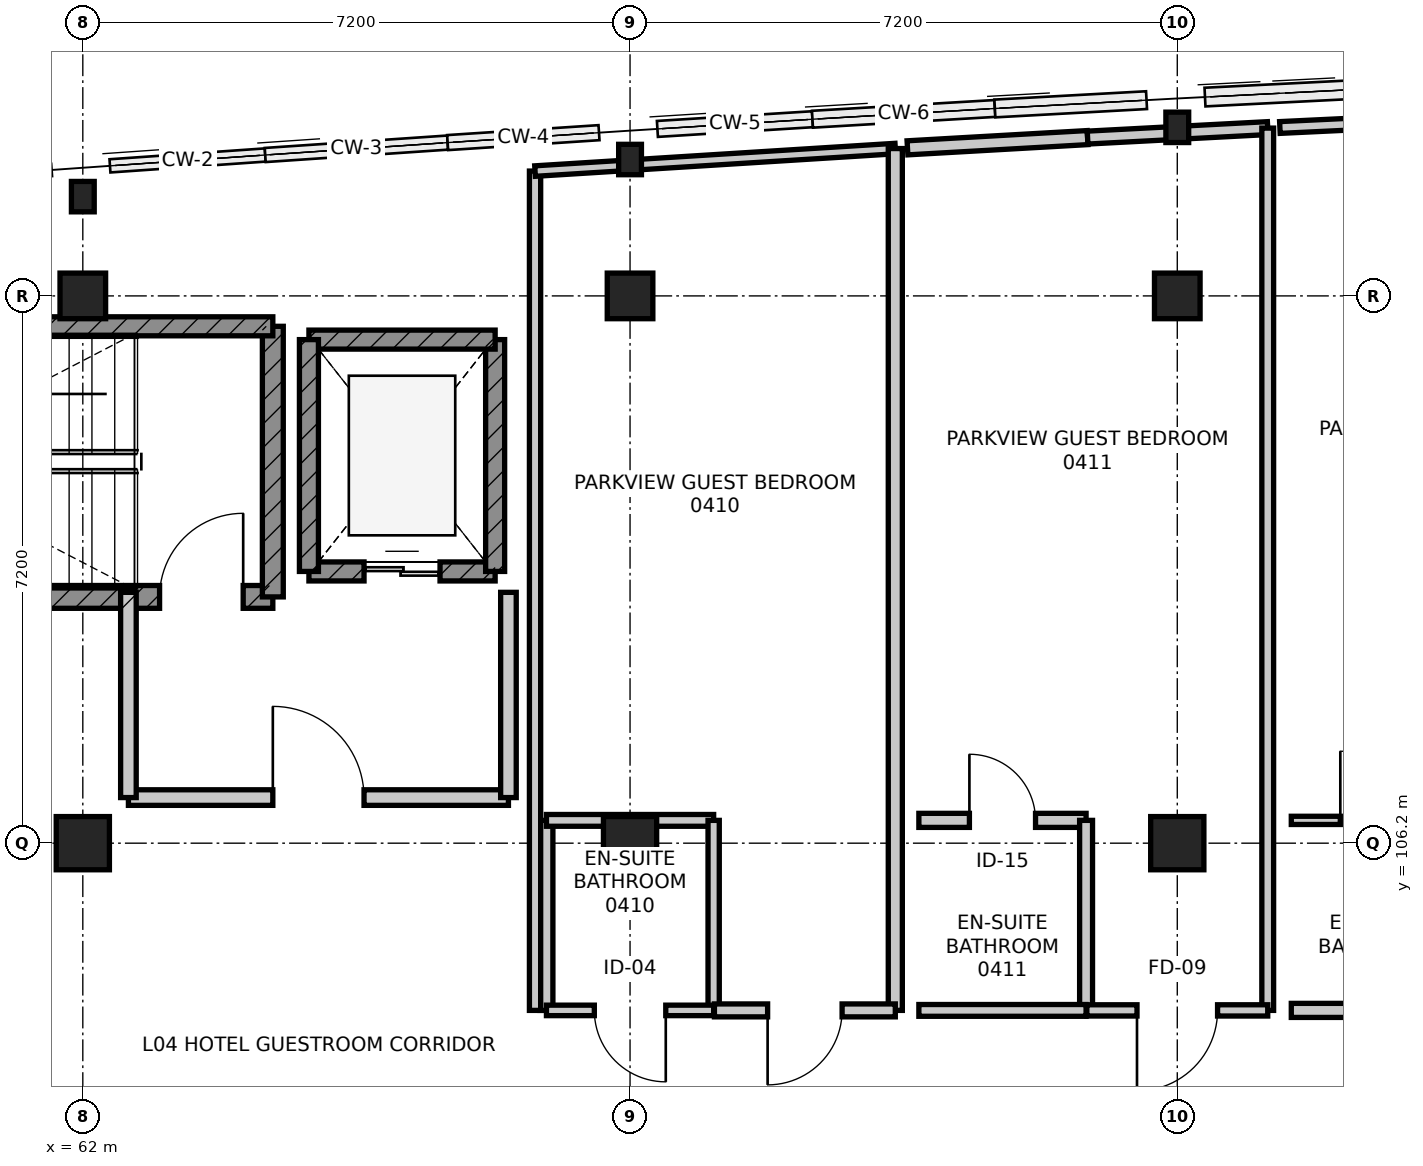
"""IFC4 building model, lengths in metres.
Left out: names, types, materials, properties, quantities, classifications, styles, units other than length and angle.
Written with IfcOpenShell. Run it as: python <this file> out.ifc"""

import sys

from ifc_helpers import new_model, si_unit, direction, frame, frame_2d, origin, origin_2d, place, context, subcontext, project, spatial, rectangle, i_section, extrude, element, fill, save


model = new_model("IFC4")
c1 = context("Model", 3, precision=1e-05, world=origin(), true_north=direction((0.0, 1.0)))
c2 = subcontext(c1, "Body", "Model", "MODEL_VIEW")
j1 = project(units=[si_unit("LENGTHUNIT", "METRE"), si_unit("PLANEANGLEUNIT", "RADIAN")], contexts=[c1])
p1 = place(None, origin())
s1 = spatial("IfcSite", under=j1, at=p1, CompositionType="ELEMENT")
p2 = place(p1, origin())
s2 = spatial("IfcBuilding", under=s1, at=p2, CompositionType="ELEMENT")
p3 = place(p2, frame((0.0, 0.0, 19.2)))
s3 = spatial("IfcBuildingStorey", under=s2, at=p3, CompositionType="ELEMENT", Elevation=19.2)
p4 = place(p3, frame((62.0, 106.2, 0.0), z_axis=(0.0, 0.0, 1.0), x_axis=(1.0, 0.0, 0.0)))
e1 = element("IfcColumn", 1, at=p4, inside=s3, PredefinedType="COLUMN", context=c2, shape_type="SweptSolid", body=[
    extrude(rectangle(XDim=0.7, YDim=0.7, at=origin_2d()), origin(), (0.0, 0.0, 1.0), 3.6),
])
p5 = place(p3, frame((62.0, 113.4, 0.0), z_axis=(0.0, 0.0, 1.0), x_axis=(1.0, 0.0, 0.0)))
e2 = element("IfcColumn", 2, at=p5, inside=s3, PredefinedType="COLUMN", context=c2, shape_type="SweptSolid", body=[
    extrude(rectangle(XDim=0.6, YDim=0.6, at=origin_2d()), origin(), (0.0, 0.0, 1.0), 3.6),
])
p6 = place(p3, frame((62.0, 114.706, 0.0), z_axis=(0.0, 0.0, 1.0), x_axis=(1.0, 0.0, 0.0)))
e3 = element("IfcColumn", 3, at=p6, inside=s3, PredefinedType="COLUMN", context=c2, shape_type="SweptSolid", body=[
    extrude(i_section(OverallWidth=0.3, OverallDepth=0.4, WebThickness=0.013, FlangeThickness=0.024, FilletRadius=0.027, at=origin_2d()), origin(), (0.0, 0.0, 1.0), 3.6),
])
p7 = place(p3, frame((69.2, 106.2, 0.0), z_axis=(0.0, 0.0, 1.0), x_axis=(1.0, 0.0, 0.0)))
e4 = element("IfcColumn", 4, at=p7, inside=s3, PredefinedType="COLUMN", context=c2, shape_type="SweptSolid", body=[
    extrude(rectangle(XDim=0.7, YDim=0.7, at=origin_2d()), origin(), (0.0, 0.0, 1.0), 3.6),
])
p8 = place(p3, frame((69.2, 113.4, 0.0), z_axis=(0.0, 0.0, 1.0), x_axis=(1.0, 0.0, 0.0)))
e5 = element("IfcColumn", 5, at=p8, inside=s3, PredefinedType="COLUMN", context=c2, shape_type="SweptSolid", body=[
    extrude(rectangle(XDim=0.6, YDim=0.6, at=origin_2d()), origin(), (0.0, 0.0, 1.0), 3.6),
])
p9 = place(p3, frame((69.2, 115.194, 0.0), z_axis=(0.0, 0.0, 1.0), x_axis=(1.0, 0.0, 0.0)))
e6 = element("IfcColumn", 6, at=p9, inside=s3, PredefinedType="COLUMN", context=c2, shape_type="SweptSolid", body=[
    extrude(i_section(OverallWidth=0.3, OverallDepth=0.4, WebThickness=0.013, FlangeThickness=0.024, FilletRadius=0.027, at=origin_2d()), origin(), (0.0, 0.0, 1.0), 3.6),
])
p10 = place(p3, frame((76.4, 106.2, 0.0), z_axis=(0.0, 0.0, 1.0), x_axis=(1.0, 0.0, 0.0)))
e7 = element("IfcColumn", 7, at=p10, inside=s3, PredefinedType="COLUMN", context=c2, shape_type="SweptSolid", body=[
    extrude(rectangle(XDim=0.7, YDim=0.7, at=origin_2d()), origin(), (0.0, 0.0, 1.0), 3.6),
])
p11 = place(p3, frame((76.4, 113.4, 0.0), z_axis=(0.0, 0.0, 1.0), x_axis=(1.0, 0.0, 0.0)))
e8 = element("IfcColumn", 8, at=p11, inside=s3, PredefinedType="COLUMN", context=c2, shape_type="SweptSolid", body=[
    extrude(rectangle(XDim=0.6, YDim=0.6, at=origin_2d()), origin(), (0.0, 0.0, 1.0), 3.6),
])
p12 = place(p3, frame((76.4, 115.618, 0.0), z_axis=(0.0, 0.0, 1.0), x_axis=(1.0, 0.0, 0.0)))
e9 = element("IfcColumn", 9, at=p12, inside=s3, PredefinedType="COLUMN", context=c2, shape_type="SweptSolid", body=[
    extrude(i_section(OverallWidth=0.3, OverallDepth=0.4, WebThickness=0.013, FlangeThickness=0.024, FilletRadius=0.027, at=origin_2d()), origin(), (0.0, 0.0, 1.0), 3.6),
])
p13 = place(p3, frame((56.1, 109.44, 0.0), z_axis=(0.0, 0.0, 1.0), x_axis=(1.0, 0.0, 0.0)))
e10 = element("IfcWall", 10, at=p13, inside=s3, PredefinedType="SHEAR", context=c2, shape_type="SweptSolid", body=[
    extrude(rectangle(XDim=8.4, YDim=0.3, at=frame_2d((4.2, 0.0))), origin(), (0.0, 0.0, 1.0), 3.35),
])
p14 = place(p13, frame((6.91, 0.0, 0.0)))
e11 = element("IfcOpeningElement", 11, at=p14, cuts=e10, PredefinedType="OPENING", context=c2, shape_type="SweptSolid", body=[
    extrude(rectangle(XDim=1.1, YDim=2.1, at=frame_2d((0.55, 1.05))), frame((0.0, 0.16, 0.0), z_axis=(0.0, -1.0, 0.0), x_axis=(1.0, 0.0, 0.0)), (0.0, 0.0, 1.0), 0.32),
])
p15 = place(p3, frame((64.5, 109.44, 0.0), z_axis=(0.0, 0.0, 1.0), x_axis=(0.0, 1.0, 0.0)))
e12 = element("IfcWall", 12, at=p15, inside=s3, PredefinedType="SHEAR", context=c2, shape_type="SweptSolid", body=[
    extrude(rectangle(XDim=3.56, YDim=0.275, at=frame_2d((1.78, 0.0))), origin(), (0.0, 0.0, 1.0), 3.35),
])
p16 = place(p3, frame((64.5, 113.0, 0.0), z_axis=(0.0, 0.0, 1.0), x_axis=(-1.0, 0.0, 0.0)))
e13 = element("IfcWall", 13, at=p16, inside=s3, PredefinedType="SHEAR", context=c2, shape_type="SweptSolid", body=[
    extrude(rectangle(XDim=8.4, YDim=0.25, at=frame_2d((4.2, 0.0))), origin(), (0.0, 0.0, 1.0), 3.35),
])
p17 = place(p3, frame((64.975, 109.775, 0.0), z_axis=(0.0, 0.0, 1.0), x_axis=(1.0, 0.0, 0.0)))
e14 = element("IfcWall", 14, at=p17, inside=s3, PredefinedType="SHEAR", context=c2, shape_type="SweptSolid", body=[
    extrude(rectangle(XDim=2.45, YDim=0.25, at=frame_2d((1.225, 0.0))), origin(), (0.0, 0.0, 1.0), 3.35),
])
p18 = place(p17, frame((0.725, 0.0, 0.0)))
e15 = element("IfcOpeningElement", 15, at=p18, cuts=e14, PredefinedType="OPENING", context=c2, shape_type="SweptSolid", body=[
    extrude(rectangle(XDim=1.0, YDim=2.15, at=frame_2d((0.5, 1.075))), frame((0.0, 0.135, 0.0), z_axis=(0.0, -1.0, 0.0), x_axis=(1.0, 0.0, 0.0)), (0.0, 0.0, 1.0), 0.27),
])
p19 = place(p3, frame((67.425, 109.775, 0.0), z_axis=(0.0, 0.0, 1.0), x_axis=(0.0, 1.0, 0.0)))
e16 = element("IfcWall", 16, at=p19, inside=s3, PredefinedType="SHEAR", context=c2, shape_type="SweptSolid", body=[
    extrude(rectangle(XDim=3.05, YDim=0.25, at=frame_2d((1.525, 0.0))), origin(), (0.0, 0.0, 1.0), 3.35),
])
p20 = place(p3, frame((67.425, 112.825, 0.0), z_axis=(0.0, 0.0, 1.0), x_axis=(-1.0, 0.0, 0.0)))
e17 = element("IfcWall", 17, at=p20, inside=s3, PredefinedType="SHEAR", context=c2, shape_type="SweptSolid", body=[
    extrude(rectangle(XDim=2.45, YDim=0.25, at=frame_2d((1.225, 0.0))), origin(), (0.0, 0.0, 1.0), 3.35),
])
p21 = place(p3, frame((64.975, 112.825, 0.0), z_axis=(0.0, 0.0, 1.0), x_axis=(0.0, -1.0, 0.0)))
e18 = element("IfcWall", 18, at=p21, inside=s3, PredefinedType="SHEAR", context=c2, shape_type="SweptSolid", body=[
    extrude(rectangle(XDim=3.05, YDim=0.25, at=frame_2d((1.525, 0.0))), origin(), (0.0, 0.0, 1.0), 3.35),
])
p22 = place(p3, frame((62.6, 106.8, 0.0), z_axis=(0.0, 0.0, 1.0), x_axis=(1.0, 0.0, 0.0)))
e19 = element("IfcWall", 19, at=p22, inside=s3, PredefinedType="PARTITIONING", context=c2, shape_type="SweptSolid", body=[
    extrude(rectangle(XDim=5.0, YDim=0.205, at=frame_2d((2.5, 0.0))), origin(), (0.0, 0.0, 1.0), 3.35),
])
p23 = place(p22, frame((1.9, 0.0, 0.0)))
e20 = element("IfcOpeningElement", 20, at=p23, cuts=e19, PredefinedType="OPENING", context=c2, shape_type="SweptSolid", body=[
    extrude(rectangle(XDim=1.2, YDim=2.1, at=frame_2d((0.6, 1.05))), frame((0.0, 0.113, 0.0), z_axis=(0.0, -1.0, 0.0), x_axis=(1.0, 0.0, 0.0)), (0.0, 0.0, 1.0), 0.225),
])
for number, where, z_axis, x_axis in (
    (21, (67.6, 106.8, 0.0), (0.0, 0.0, 1.0), (0.0, 1.0, 0.0)),
    (22, (62.6, 109.5, 0.0), (0.0, 0.0, 1.0), (0.0, -1.0, 0.0)),
):
    element("IfcWall", number, at=place(p3, frame(where, z_axis=z_axis, x_axis=x_axis)), inside=s3, PredefinedType="PARTITIONING", context=c2, shape_type="SweptSolid", body=[
        extrude(rectangle(XDim=2.7, YDim=0.205, at=frame_2d((1.35, 0.0))), origin(), (0.0, 0.0, 1.0), 3.35),
    ])
p24 = place(p3, frame((68.1, 104.0, 0.0), z_axis=(0.0, 0.0, 1.0), x_axis=(0.0, 1.0, 0.0)))
e23 = element("IfcWall", 23, at=p24, inside=s3, PredefinedType="PARTITIONING", context=c2, shape_type="SweptSolid", body=[
    extrude(rectangle(XDim=2.5, YDim=0.17, at=frame_2d((1.25, 0.0))), origin(), (0.0, 0.0, 1.0), 2.735),
])
p25 = place(p3, frame((68.1, 106.5, 0.0), z_axis=(0.0, 0.0, 1.0), x_axis=(1.0, 0.0, 0.0)))
e24 = element("IfcWall", 24, at=p25, inside=s3, PredefinedType="PARTITIONING", context=c2, shape_type="SweptSolid", body=[
    extrude(rectangle(XDim=2.2, YDim=0.155, at=frame_2d((1.1, 0.0))), origin(), (0.0, 0.0, 1.0), 2.685),
])
p26 = place(p3, frame((70.3, 106.5, 0.0), z_axis=(0.0, 0.0, 1.0), x_axis=(0.0, -1.0, 0.0)))
e25 = element("IfcWall", 25, at=p26, inside=s3, PredefinedType="PARTITIONING", context=c2, shape_type="SweptSolid", body=[
    extrude(rectangle(XDim=2.5, YDim=0.148, at=frame_2d((1.25, 0.0))), origin(), (0.0, 0.0, 1.0), 2.735),
])
p27 = place(p3, frame((70.3, 104.0, 0.0), z_axis=(0.0, 0.0, 1.0), x_axis=(-1.0, 0.0, 0.0)))
e26 = element("IfcWall", 26, at=p27, inside=s3, PredefinedType="PARTITIONING", context=c2, shape_type="SweptSolid", body=[
    extrude(rectangle(XDim=2.2, YDim=0.138, at=frame_2d((1.1, 0.0))), origin(), (0.0, 0.0, 1.0), 2.685),
])
p28 = place(p27, frame((0.63, 0.0, 0.0)))
e27 = element("IfcOpeningElement", 27, at=p28, cuts=e26, PredefinedType="OPENING", context=c2, shape_type="SweptSolid", body=[
    extrude(rectangle(XDim=0.94, YDim=2.12, at=frame_2d((0.47, 1.06))), frame((0.0, 0.079, 0.0), z_axis=(0.0, -1.0, 0.0), x_axis=(1.0, 0.0, 0.0)), (0.0, 0.0, 1.0), 0.158),
])
p29 = place(p3, frame((67.95, 104.0, 0.0), z_axis=(0.0, 0.0, 1.0), x_axis=(0.0, 1.0, 0.0)))
e28 = element("IfcWall", 28, at=p29, inside=s3, PredefinedType="PARTITIONING", context=c2, shape_type="SweptSolid", body=[
    extrude(rectangle(XDim=11.042, YDim=0.148, at=frame_2d((5.521, 0.0))), origin(), (0.0, 0.0, 1.0), 2.735),
])
p30 = place(p3, frame((67.95, 115.042, 0.0), z_axis=(0.0, 0.0, 1.0), x_axis=(0.998050777851, 0.062407089586, 0.0)))
e29 = element("IfcWall", 29, at=p30, inside=s3, PredefinedType="PARTITIONING", context=c2, shape_type="SweptSolid", body=[
    extrude(rectangle(XDim=4.749, YDim=0.138, at=frame_2d((2.375, 0.0))), origin(), (0.0, 0.0, 1.0), 2.926),
])
p31 = place(p3, frame((72.69, 115.339, 0.0), z_axis=(0.0, 0.0, 1.0), x_axis=(0.0, -1.0, 0.0)))
e30 = element("IfcWall", 30, at=p31, inside=s3, PredefinedType="PARTITIONING", context=c2, shape_type="SweptSolid", body=[
    extrude(rectangle(XDim=11.339, YDim=0.185, at=frame_2d((5.669, 0.0))), origin(), (0.0, 0.0, 1.0), 2.735),
])
p32 = place(p3, frame((72.69, 104.0, 0.0), z_axis=(0.0, 0.0, 1.0), x_axis=(-1.0, 0.0, 0.0)))
e31 = element("IfcWall", 31, at=p32, inside=s3, PredefinedType="PARTITIONING", context=c2, shape_type="SweptSolid", body=[
    extrude(rectangle(XDim=2.38, YDim=0.17, at=frame_2d((1.19, 0.0))), origin(), (0.0, 0.0, 1.0), 3.35),
])
p33 = place(p32, frame((0.7, 0.0, 0.0)))
e32 = element("IfcOpeningElement", 32, at=p33, cuts=e31, PredefinedType="OPENING", context=c2, shape_type="SweptSolid", body=[
    extrude(rectangle(XDim=0.98, YDim=2.15, at=frame_2d((0.49, 1.075))), frame((0.0, 0.095, 0.0), z_axis=(0.0, -1.0, 0.0), x_axis=(1.0, 0.0, 0.0)), (0.0, 0.0, 1.0), 0.19),
])
p34 = place(p3, frame((73.0, 106.5, 0.0), z_axis=(0.0, 0.0, 1.0), x_axis=(1.0, 0.0, 0.0)))
e33 = element("IfcWall", 33, at=p34, inside=s3, PredefinedType="PARTITIONING", context=c2, shape_type="SweptSolid", body=[
    extrude(rectangle(XDim=2.2, YDim=0.185, at=frame_2d((1.1, 0.0))), origin(), (0.0, 0.0, 1.0), 2.735),
])
p35 = place(p34, frame((0.665, 0.0, 0.0)))
e34 = element("IfcOpeningElement", 34, at=p35, cuts=e33, PredefinedType="OPENING", context=c2, shape_type="SweptSolid", body=[
    extrude(rectangle(XDim=0.87, YDim=2.07, at=frame_2d((0.435, 1.035))), frame((0.0, 0.103, 0.0), z_axis=(0.0, -1.0, 0.0), x_axis=(1.0, 0.0, 0.0)), (0.0, 0.0, 1.0), 0.205),
])
p36 = place(p3, frame((75.2, 106.5, 0.0), z_axis=(0.0, 0.0, 1.0), x_axis=(0.0, -1.0, 0.0)))
e35 = element("IfcWall", 35, at=p36, inside=s3, PredefinedType="PARTITIONING", context=c2, shape_type="SweptSolid", body=[
    extrude(rectangle(XDim=2.5, YDim=0.17, at=frame_2d((1.25, 0.0))), origin(), (0.0, 0.0, 1.0), 2.735),
])
p37 = place(p3, frame((75.2, 104.0, 0.0), z_axis=(0.0, 0.0, 1.0), x_axis=(-1.0, 0.0, 0.0)))
e36 = element("IfcWall", 36, at=p37, inside=s3, PredefinedType="PARTITIONING", context=c2, shape_type="SweptSolid", body=[
    extrude(rectangle(XDim=2.2, YDim=0.155, at=frame_2d((1.1, 0.0))), origin(), (0.0, 0.0, 1.0), 3.35),
])
p38 = place(p3, frame((72.85, 115.348, 0.0), z_axis=(0.0, 0.0, 1.0), x_axis=(0.99838702976, 0.056774455592, 0.0)))
e37 = element("IfcWall", 37, at=p38, inside=s3, PredefinedType="PARTITIONING", context=c2, shape_type="SweptSolid", body=[
    extrude(rectangle(XDim=2.374, YDim=0.185, at=frame_2d((1.187, 0.0))), origin(), (0.0, 0.0, 1.0), 2.926),
])
p39 = place(p3, frame((75.22, 115.483, 0.0), z_axis=(0.0, 0.0, 1.0), x_axis=(0.998622939487, 0.052461650097, 0.0)))
e38 = element("IfcWall", 38, at=p39, inside=s3, PredefinedType="PARTITIONING", context=c2, shape_type="SweptSolid", body=[
    extrude(rectangle(XDim=2.373, YDim=0.17, at=frame_2d((1.187, 0.0))), origin(), (0.0, 0.0, 1.0), 2.926),
])
p40 = place(p3, frame((77.59, 115.607, 0.0), z_axis=(0.0, 0.0, 1.0), x_axis=(0.0, -1.0, 0.0)))
e39 = element("IfcWall", 39, at=p40, inside=s3, PredefinedType="PARTITIONING", context=c2, shape_type="SweptSolid", body=[
    extrude(rectangle(XDim=11.607, YDim=0.155, at=frame_2d((5.804, 0.0))), origin(), (0.0, 0.0, 1.0), 2.735),
])
p41 = place(p3, frame((77.59, 104.0, 0.0), z_axis=(0.0, 0.0, 1.0), x_axis=(-1.0, 0.0, 0.0)))
e40 = element("IfcWall", 40, at=p41, inside=s3, PredefinedType="PARTITIONING", context=c2, shape_type="SweptSolid", body=[
    extrude(rectangle(XDim=2.38, YDim=0.148, at=frame_2d((1.19, 0.0))), origin(), (0.0, 0.0, 1.0), 2.685),
])
p42 = place(p41, frame((0.66, 0.0, 0.0)))
e41 = element("IfcOpeningElement", 41, at=p42, cuts=e40, PredefinedType="OPENING", context=c2, shape_type="SweptSolid", body=[
    extrude(rectangle(XDim=1.06, YDim=2.2, at=frame_2d((0.53, 1.1))), frame((0.0, 0.084, 0.0), z_axis=(0.0, -1.0, 0.0), x_axis=(1.0, 0.0, 0.0)), (0.0, 0.0, 1.0), 0.168),
])
p43 = place(p3, frame((77.9, 106.5, 0.0), z_axis=(0.0, 0.0, 1.0), x_axis=(1.0, 0.0, 0.0)))
e42 = element("IfcWall", 42, at=p43, inside=s3, PredefinedType="PARTITIONING", context=c2, shape_type="SweptSolid", body=[
    extrude(rectangle(XDim=2.2, YDim=0.108, at=frame_2d((1.1, 0.0))), origin(), (0.0, 0.0, 1.0), 3.35),
])
p44 = place(p43, frame((0.645, 0.0, 0.0)))
e43 = element("IfcOpeningElement", 43, at=p44, cuts=e42, PredefinedType="OPENING", context=c2, shape_type="SweptSolid", body=[
    extrude(rectangle(XDim=0.91, YDim=2.11, at=frame_2d((0.455, 1.055))), frame((0.0, 0.064, 0.0), z_axis=(0.0, -1.0, 0.0), x_axis=(1.0, 0.0, 0.0)), (0.0, 0.0, 1.0), 0.128),
])
p45 = place(p3, frame((80.1, 104.0, 0.0), z_axis=(0.0, 0.0, 1.0), x_axis=(-1.0, 0.0, 0.0)))
e44 = element("IfcWall", 44, at=p45, inside=s3, PredefinedType="PARTITIONING", context=c2, shape_type="SweptSolid", body=[
    extrude(rectangle(XDim=2.2, YDim=0.185, at=frame_2d((1.1, 0.0))), origin(), (0.0, 0.0, 1.0), 3.35),
])
p46 = place(p3, frame((77.75, 115.615, 0.0), z_axis=(0.0, 0.0, 1.0), x_axis=(0.998864643261, 0.047638476497, 0.0)))
e45 = element("IfcWall", 45, at=p46, inside=s3, PredefinedType="PARTITIONING", context=c2, shape_type="SweptSolid", body=[
    extrude(rectangle(XDim=2.373, YDim=0.155, at=frame_2d((1.187, 0.0))), origin(), (0.0, 0.0, 1.0), 2.926),
])
p47 = place(p14, origin())
e46 = element("IfcDoor", 46, at=p47, inside=s3, OperationType="SINGLE_SWING_RIGHT", PredefinedType="DOOR", context=c2, shape_type="SweptSolid", body=[
    extrude(rectangle(XDim=1.1, YDim=2.1, at=frame_2d((0.55, 1.05))), frame((0.0, 0.025, 0.0), z_axis=(0.0, -1.0, 0.0), x_axis=(1.0, 0.0, 0.0)), (0.0, 0.0, 1.0), 0.05),
])
fill(e11, e46)
p48 = place(p18, origin())
e47 = element("IfcDoor", 47, at=p48, inside=s3, OperationType="DOUBLE_DOOR_SLIDING", PredefinedType="DOOR", context=c2, shape_type="SweptSolid", body=[
    extrude(rectangle(XDim=1.0, YDim=2.15, at=frame_2d((0.5, 1.075))), frame((0.0, 0.025, 0.0), z_axis=(0.0, -1.0, 0.0), x_axis=(1.0, 0.0, 0.0)), (0.0, 0.0, 1.0), 0.05),
])
fill(e15, e47)
p49 = place(p23, origin())
e48 = element("IfcDoor", 48, at=p49, inside=s3, OperationType="SINGLE_SWING_LEFT", PredefinedType="DOOR", context=c2, shape_type="SweptSolid", body=[
    extrude(rectangle(XDim=1.2, YDim=2.1, at=frame_2d((0.6, 1.05))), frame((0.0, 0.025, 0.0), z_axis=(0.0, -1.0, 0.0), x_axis=(1.0, 0.0, 0.0)), (0.0, 0.0, 1.0), 0.05),
])
fill(e20, e48)
p50 = place(p28, origin())
e49 = element("IfcDoor", 49, at=p50, inside=s3, OperationType="SINGLE_SWING_LEFT", PredefinedType="DOOR", context=c2, shape_type="SweptSolid", body=[
    extrude(rectangle(XDim=0.94, YDim=2.12, at=frame_2d((0.47, 1.06))), frame((0.0, 0.025, 0.0), z_axis=(0.0, -1.0, 0.0), x_axis=(1.0, 0.0, 0.0)), (0.0, 0.0, 1.0), 0.05),
])
fill(e27, e49)
p51 = place(p33, origin())
e50 = element("IfcDoor", 50, at=p51, inside=s3, OperationType="SINGLE_SWING_RIGHT", PredefinedType="DOOR", context=c2, shape_type="SweptSolid", body=[
    extrude(rectangle(XDim=0.98, YDim=2.15, at=frame_2d((0.49, 1.075))), frame((0.0, 0.025, 0.0), z_axis=(0.0, -1.0, 0.0), x_axis=(1.0, 0.0, 0.0)), (0.0, 0.0, 1.0), 0.05),
])
fill(e32, e50)
p52 = place(p35, origin())
e51 = element("IfcDoor", 51, at=p52, inside=s3, OperationType="SINGLE_SWING_LEFT", PredefinedType="DOOR", context=c2, shape_type="SweptSolid", body=[
    extrude(rectangle(XDim=0.87, YDim=2.07, at=frame_2d((0.435, 1.035))), frame((0.0, 0.025, 0.0), z_axis=(0.0, -1.0, 0.0), x_axis=(1.0, 0.0, 0.0)), (0.0, 0.0, 1.0), 0.05),
])
fill(e34, e51)
p53 = place(p42, origin())
e52 = element("IfcDoor", 52, at=p53, inside=s3, OperationType="SINGLE_SWING_RIGHT", PredefinedType="DOOR", context=c2, shape_type="SweptSolid", body=[
    extrude(rectangle(XDim=1.06, YDim=2.2, at=frame_2d((0.53, 1.1))), frame((0.0, 0.025, 0.0), z_axis=(0.0, -1.0, 0.0), x_axis=(1.0, 0.0, 0.0)), (0.0, 0.0, 1.0), 0.05),
])
fill(e41, e52)
p54 = place(p44, origin())
e53 = element("IfcDoor", 53, at=p54, inside=s3, OperationType="SINGLE_SWING_LEFT", PredefinedType="DOOR", context=c2, shape_type="SweptSolid", body=[
    extrude(rectangle(XDim=0.91, YDim=2.11, at=frame_2d((0.455, 1.055))), frame((0.0, 0.025, 0.0), z_axis=(0.0, -1.0, 0.0), x_axis=(1.0, 0.0, 0.0)), (0.0, 0.0, 1.0), 0.05),
])
fill(e43, e53)
save(model, sys.argv[1])
